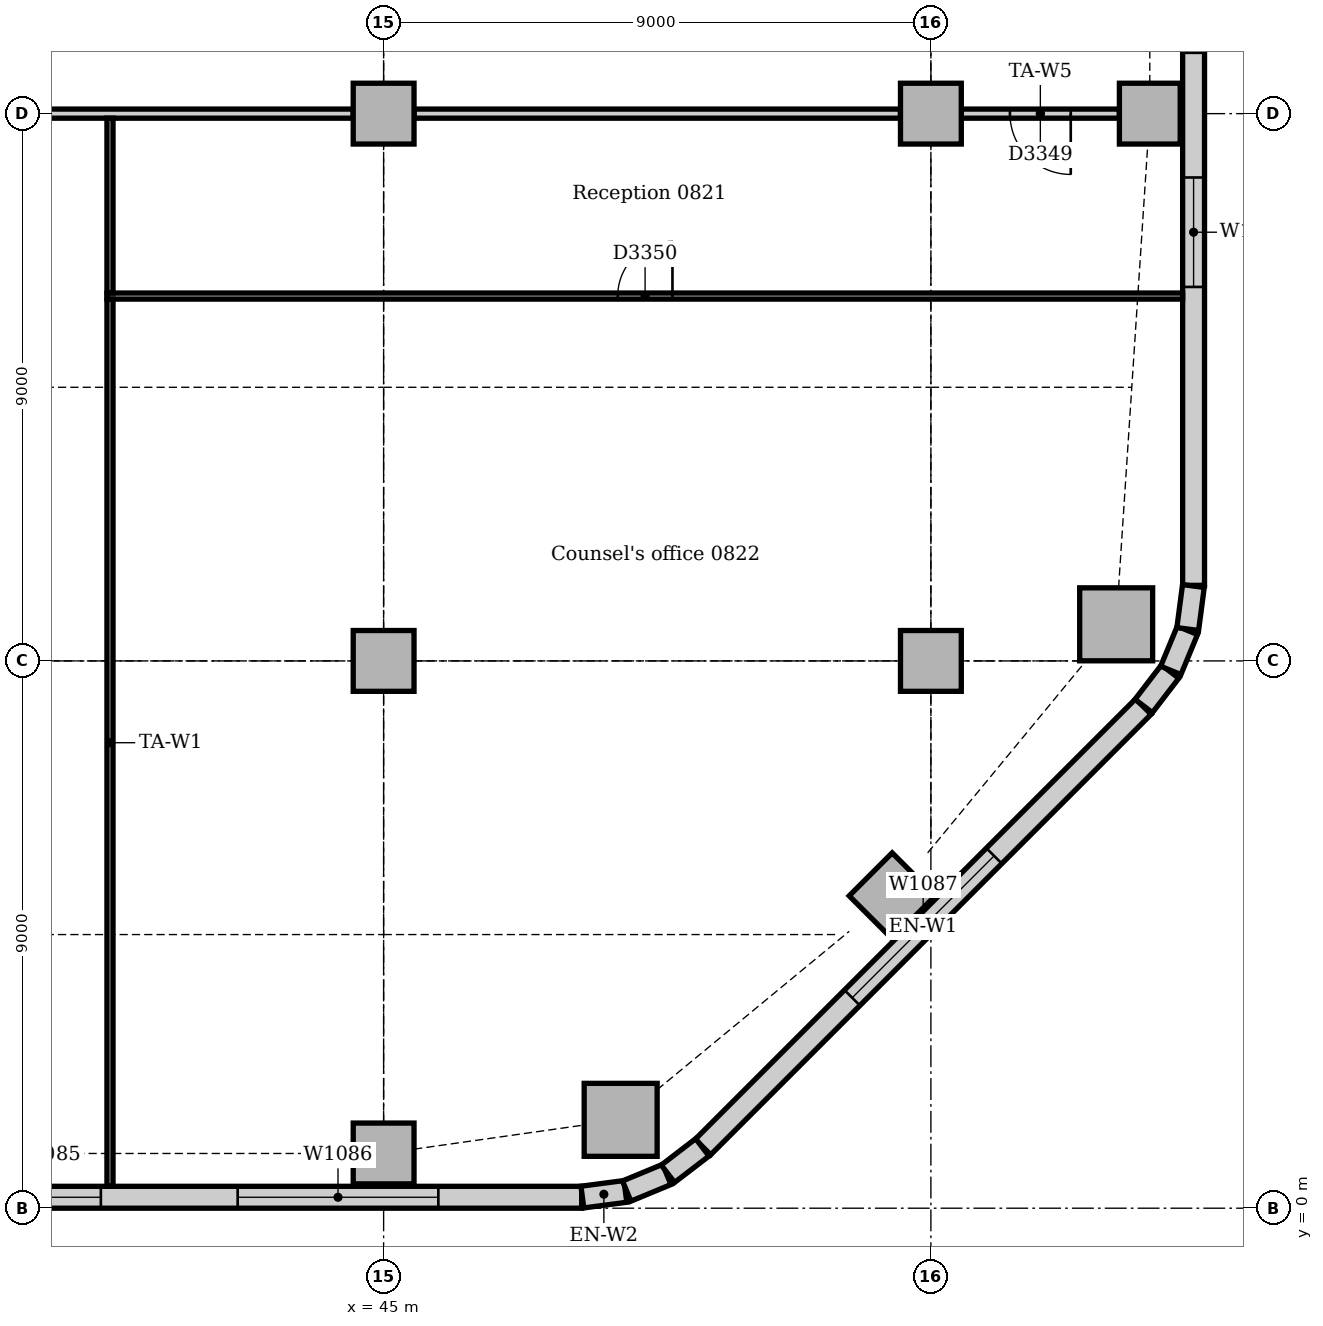
"""IFC4 building model, lengths in metres.
Left out: names, types, materials, properties, quantities, classifications, styles, units other than length and angle.
Written with IfcOpenShell. Run it as: python <this file> out.ifc"""

import sys

from ifc_helpers import new_model, si_unit, direction, frame, frame_2d, origin, origin_2d, place, context, subcontext, project, spatial, rectangle, extrude, element, fill, save


model = new_model("IFC4")
c1 = context("Model", 3, precision=1e-05, world=origin(), true_north=direction((0.0, 1.0)))
c2 = subcontext(c1, "Body", "Model", "MODEL_VIEW")
j1 = project(units=[si_unit("LENGTHUNIT", "METRE"), si_unit("PLANEANGLEUNIT", "RADIAN")], contexts=[c1])
p1 = place(None, origin())
s1 = spatial("IfcSite", under=j1, at=p1, CompositionType="ELEMENT")
p2 = place(p1, origin())
s2 = spatial("IfcBuilding", under=s1, at=p2, CompositionType="ELEMENT")
p3 = place(p2, frame((0.0, 0.0, 38.0)))
s3 = spatial("IfcBuildingStorey", under=s2, at=p3, CompositionType="ELEMENT", Elevation=38.0)
for number, where, z_axis, x_axis in (
    (1, (48.898, 1.453, 0.0), (0.0, 0.0, 1.0), (1.0, 0.0, 0.0)),
    (2, (57.047, 9.602, 0.0), (0.0, 0.0, 1.0), (1.0, 0.0, 0.0)),
):
    element("IfcColumn", number, at=place(p3, frame(where, z_axis=z_axis, x_axis=x_axis)), inside=s3, PredefinedType="COLUMN", context=c2, shape_type="SweptSolid", body=[
        extrude(rectangle(XDim=1.2, YDim=1.2, at=origin_2d()), origin(), (0.0, 0.0, 1.0), 3.85),
    ])
for number, where, z_axis, x_axis in (
    (3, (45.0, 0.9, 0.0), (0.0, 0.0, 1.0), (1.0, 0.0, 0.0)),
    (4, (53.364, 5.136, 0.0), (0.0, 0.0, 1.0), (0.707, 0.707, 0.0)),
    (5, (57.6, 18.0, 0.0), (0.0, 0.0, 1.0), (1.0, 0.0, 0.0)),
    (6, (45.0, 9.0, 0.0), (0.0, 0.0, 1.0), (1.0, 0.0, 0.0)),
    (7, (45.0, 18.0, 0.0), (0.0, 0.0, 1.0), (1.0, 0.0, 0.0)),
    (8, (54.0, 9.0, 0.0), (0.0, 0.0, 1.0), (1.0, 0.0, 0.0)),
    (9, (54.0, 18.0, 0.0), (0.0, 0.0, 1.0), (1.0, 0.0, 0.0)),
):
    element("IfcColumn", number, at=place(p3, frame(where, z_axis=z_axis, x_axis=x_axis)), inside=s3, PredefinedType="COLUMN", context=c2, shape_type="SweptSolid", body=[
        extrude(rectangle(XDim=1.0, YDim=1.0, at=origin_2d()), origin(), (0.0, 0.0, 1.0), 3.85),
    ])
p4 = place(p3, frame((4.243, 0.18, 0.0), z_axis=(0.0, 0.0, 1.0), x_axis=(1.0, 0.0, 0.0)))
e10 = element("IfcWall", 10, at=p4, inside=s3, PredefinedType="STANDARD", context=c2, shape_type="SweptSolid", body=[
    extrude(rectangle(XDim=44.015, YDim=0.36, at=frame_2d((22.007, 0.0))), origin(), (0.0, 0.0, 1.0), 3.85),
])
p5 = place(p4, frame((2.357, 0.0, 0.9)))
e11 = element("IfcOpeningElement", 11, at=p5, cuts=e10, PredefinedType="OPENING", context=c2, shape_type="SweptSolid", body=[
    extrude(rectangle(XDim=3.3, YDim=1.6, at=frame_2d((1.65, 0.8))), frame((0.0, 0.19, 0.0), z_axis=(0.0, -1.0, 0.0), x_axis=(1.0, 0.0, 0.0)), (0.0, 0.0, 1.0), 0.38),
])
p6 = place(p4, frame((6.857, 0.0, 0.9)))
e12 = element("IfcOpeningElement", 12, at=p6, cuts=e10, PredefinedType="OPENING", context=c2, shape_type="SweptSolid", body=[
    extrude(rectangle(XDim=3.3, YDim=1.6, at=frame_2d((1.65, 0.8))), frame((0.0, 0.19, 0.0), z_axis=(0.0, -1.0, 0.0), x_axis=(1.0, 0.0, 0.0)), (0.0, 0.0, 1.0), 0.38),
])
p7 = place(p4, frame((11.357, 0.0, 0.9)))
e13 = element("IfcOpeningElement", 13, at=p7, cuts=e10, PredefinedType="OPENING", context=c2, shape_type="SweptSolid", body=[
    extrude(rectangle(XDim=3.3, YDim=1.6, at=frame_2d((1.65, 0.8))), frame((0.0, 0.19, 0.0), z_axis=(0.0, -1.0, 0.0), x_axis=(1.0, 0.0, 0.0)), (0.0, 0.0, 1.0), 0.38),
])
p8 = place(p4, frame((15.857, 0.0, 0.9)))
e14 = element("IfcOpeningElement", 14, at=p8, cuts=e10, PredefinedType="OPENING", context=c2, shape_type="SweptSolid", body=[
    extrude(rectangle(XDim=3.3, YDim=1.6, at=frame_2d((1.65, 0.8))), frame((0.0, 0.19, 0.0), z_axis=(0.0, -1.0, 0.0), x_axis=(1.0, 0.0, 0.0)), (0.0, 0.0, 1.0), 0.38),
])
p9 = place(p4, frame((20.357, 0.0, 0.9)))
e15 = element("IfcOpeningElement", 15, at=p9, cuts=e10, PredefinedType="OPENING", context=c2, shape_type="SweptSolid", body=[
    extrude(rectangle(XDim=3.3, YDim=1.6, at=frame_2d((1.65, 0.8))), frame((0.0, 0.19, 0.0), z_axis=(0.0, -1.0, 0.0), x_axis=(1.0, 0.0, 0.0)), (0.0, 0.0, 1.0), 0.38),
])
p10 = place(p4, frame((25.307, 0.0, 0.9)))
e16 = element("IfcOpeningElement", 16, at=p10, cuts=e10, PredefinedType="OPENING", context=c2, shape_type="SweptSolid", body=[
    extrude(rectangle(XDim=1.8, YDim=1.6, at=frame_2d((0.9, 0.8))), frame((0.0, 0.19, 0.0), z_axis=(0.0, -1.0, 0.0), x_axis=(1.0, 0.0, 0.0)), (0.0, 0.0, 1.0), 0.38),
])
p11 = place(p4, frame((29.357, 0.0, 0.9)))
e17 = element("IfcOpeningElement", 17, at=p11, cuts=e10, PredefinedType="OPENING", context=c2, shape_type="SweptSolid", body=[
    extrude(rectangle(XDim=3.3, YDim=1.6, at=frame_2d((1.65, 0.8))), frame((0.0, 0.19, 0.0), z_axis=(0.0, -1.0, 0.0), x_axis=(1.0, 0.0, 0.0)), (0.0, 0.0, 1.0), 0.38),
])
p12 = place(p4, frame((34.307, 0.0, 0.9)))
e18 = element("IfcOpeningElement", 18, at=p12, cuts=e10, PredefinedType="OPENING", context=c2, shape_type="SweptSolid", body=[
    extrude(rectangle(XDim=1.8, YDim=1.6, at=frame_2d((0.9, 0.8))), frame((0.0, 0.19, 0.0), z_axis=(0.0, -1.0, 0.0), x_axis=(1.0, 0.0, 0.0)), (0.0, 0.0, 1.0), 0.38),
])
p13 = place(p4, frame((38.357, 0.0, 0.9)))
e19 = element("IfcOpeningElement", 19, at=p13, cuts=e10, PredefinedType="OPENING", context=c2, shape_type="SweptSolid", body=[
    extrude(rectangle(XDim=3.3, YDim=1.6, at=frame_2d((1.65, 0.8))), frame((0.0, 0.19, 0.0), z_axis=(0.0, -1.0, 0.0), x_axis=(1.0, 0.0, 0.0)), (0.0, 0.0, 1.0), 0.38),
])
p14 = place(p3, frame((50.251, 1.006, 0.0), z_axis=(0.0, 0.0, 1.0), x_axis=(0.707106781187, 0.707106781187, 0.0)))
e20 = element("IfcWall", 20, at=p14, inside=s3, PredefinedType="STANDARD", context=c2, shape_type="SweptSolid", body=[
    extrude(rectangle(XDim=10.243, YDim=0.36, at=frame_2d((5.121, 0.0))), origin(), (0.0, 0.0, 1.0), 3.85),
])
p15 = place(p14, frame((3.471, 0.0, 0.9)))
e21 = element("IfcOpeningElement", 21, at=p15, cuts=e20, PredefinedType="OPENING", context=c2, shape_type="SweptSolid", body=[
    extrude(rectangle(XDim=3.3, YDim=1.6, at=frame_2d((1.65, 0.8))), frame((0.0, 0.19, 0.0), z_axis=(0.0, -1.0, 0.0), x_axis=(1.0, 0.0, 0.0)), (0.0, 0.0, 1.0), 0.38),
])
p16 = place(p3, frame((58.32, 10.243, 0.0), z_axis=(0.0, 0.0, 1.0), x_axis=(0.0, 1.0, 0.0)))
e22 = element("IfcWall", 22, at=p16, inside=s3, PredefinedType="STANDARD", context=c2, shape_type="SweptSolid", body=[
    extrude(rectangle(XDim=24.515, YDim=0.36, at=frame_2d((12.257, 0.0))), origin(), (0.0, 0.0, 1.0), 3.85),
])
p17 = place(p16, frame((4.907, 0.0, 0.9)))
e23 = element("IfcOpeningElement", 23, at=p17, cuts=e22, PredefinedType="OPENING", context=c2, shape_type="SweptSolid", body=[
    extrude(rectangle(XDim=1.8, YDim=1.6, at=frame_2d((0.9, 0.8))), frame((0.0, 0.19, 0.0), z_axis=(0.0, -1.0, 0.0), x_axis=(1.0, 0.0, 0.0)), (0.0, 0.0, 1.0), 0.38),
])
p18 = place(p16, frame((8.757, 0.0, 0.9)))
e24 = element("IfcOpeningElement", 24, at=p18, cuts=e22, PredefinedType="OPENING", context=c2, shape_type="SweptSolid", body=[
    extrude(rectangle(XDim=1.8, YDim=1.6, at=frame_2d((0.9, 0.8))), frame((0.0, 0.19, 0.0), z_axis=(0.0, -1.0, 0.0), x_axis=(1.0, 0.0, 0.0)), (0.0, 0.0, 1.0), 0.38),
])
p19 = place(p16, frame((12.557, 0.0, 0.9)))
e25 = element("IfcOpeningElement", 25, at=p19, cuts=e22, PredefinedType="OPENING", context=c2, shape_type="SweptSolid", body=[
    extrude(rectangle(XDim=3.3, YDim=1.6, at=frame_2d((1.65, 0.8))), frame((0.0, 0.19, 0.0), z_axis=(0.0, -1.0, 0.0), x_axis=(1.0, 0.0, 0.0)), (0.0, 0.0, 1.0), 0.38),
])
p20 = place(p16, frame((17.357, 0.0, 0.9)))
e26 = element("IfcOpeningElement", 26, at=p20, cuts=e22, PredefinedType="OPENING", context=c2, shape_type="SweptSolid", body=[
    extrude(rectangle(XDim=3.3, YDim=1.6, at=frame_2d((1.65, 0.8))), frame((0.0, 0.19, 0.0), z_axis=(0.0, -1.0, 0.0), x_axis=(1.0, 0.0, 0.0)), (0.0, 0.0, 1.0), 0.38),
])
for number, where, z_axis, x_axis in (
    (27, (48.269, 0.183, 0.0), (0.0, 0.0, 1.0), (0.991, 0.131, 0.0)),
    (28, (48.997, 0.282, 0.0), (0.0, 0.0, 1.0), (0.924, 0.383, 0.0)),
):
    element("IfcWall", number, at=place(p3, frame(where, z_axis=z_axis, x_axis=x_axis)), inside=s3, PredefinedType="STANDARD", context=c2, shape_type="SweptSolid", body=[
        extrude(rectangle(XDim=0.713, YDim=0.36, at=frame_2d((0.356, 0.0))), origin(), (0.0, 0.0, 1.0), 3.85),
    ])
for number, where, z_axis, x_axis in (
    (29, (49.675, 0.566, 0.0), (0.0, 0.0, 1.0), (0.793, 0.609, 0.0)),
    (30, (57.5, 8.259, 0.0), (0.0, 0.0, 1.0), (0.609, 0.793, 0.0)),
):
    element("IfcWall", number, at=place(p3, frame(where, z_axis=z_axis, x_axis=x_axis)), inside=s3, PredefinedType="STANDARD", context=c2, shape_type="SweptSolid", body=[
        extrude(rectangle(XDim=0.713, YDim=0.36, at=frame_2d((0.357, 0.0))), origin(), (0.0, 0.0, 1.0), 3.85),
    ])
for number, where, z_axis, x_axis in (
    (31, (57.945, 8.844, 0.0), (0.0, 0.0, 1.0), (0.383, 0.924, 0.0)),
    (32, (58.224, 9.524, 0.0), (0.0, 0.0, 1.0), (0.131, 0.991, 0.0)),
):
    element("IfcWall", number, at=place(p3, frame(where, z_axis=z_axis, x_axis=x_axis)), inside=s3, PredefinedType="STANDARD", context=c2, shape_type="SweptSolid", body=[
        extrude(rectangle(XDim=0.713, YDim=0.36, at=frame_2d((0.356, 0.0))), origin(), (0.0, 0.0, 1.0), 3.85),
    ])
p21 = place(p3, frame((54.5, 18.0, 0.0), z_axis=(0.0, 0.0, 1.0), x_axis=(1.0, 0.0, 0.0)))
e33 = element("IfcWall", 33, at=p21, inside=s3, PredefinedType="PARTITIONING", context=c2, shape_type="SweptSolid", body=[
    extrude(rectangle(XDim=2.6, YDim=0.15, at=frame_2d((1.3, 0.0))), origin(), (0.0, 0.0, 1.0), 3.602),
])
p22 = place(p21, frame((0.8, 0.0, 0.0)))
e34 = element("IfcOpeningElement", 34, at=p22, cuts=e33, PredefinedType="OPENING", context=c2, shape_type="SweptSolid", body=[
    extrude(rectangle(XDim=1.0, YDim=2.1, at=frame_2d((0.5, 1.05))), frame((0.0, 0.085, 0.0), z_axis=(0.0, -1.0, 0.0), x_axis=(1.0, 0.0, 0.0)), (0.0, 0.0, 1.0), 0.17),
])
p23 = place(p3, frame((45.5, 18.0, 0.0), z_axis=(0.0, 0.0, 1.0), x_axis=(1.0, 0.0, 0.0)))
e35 = element("IfcWall", 35, at=p23, inside=s3, PredefinedType="PARTITIONING", context=c2, shape_type="SweptSolid", body=[
    extrude(rectangle(XDim=8.0, YDim=0.15, at=frame_2d((4.0, 0.0))), origin(), (0.0, 0.0, 1.0), 3.15),
])
p24 = place(p3, frame((36.5, 18.0, 0.0), z_axis=(0.0, 0.0, 1.0), x_axis=(1.0, 0.0, 0.0)))
e36 = element("IfcWall", 36, at=p24, inside=s3, PredefinedType="PARTITIONING", context=c2, shape_type="SweptSolid", body=[
    extrude(rectangle(XDim=8.0, YDim=0.15, at=frame_2d((4.0, 0.0))), origin(), (0.0, 0.0, 1.0), 3.15),
])
p25 = place(p24, frame((1.6, 0.0, 0.0)))
e37 = element("IfcOpeningElement", 37, at=p25, cuts=e36, PredefinedType="OPENING", context=c2, shape_type="SweptSolid", body=[
    extrude(rectangle(XDim=0.9, YDim=2.1, at=frame_2d((0.45, 1.05))), frame((0.0, 0.085, 0.0), z_axis=(0.0, -1.0, 0.0), x_axis=(1.0, 0.0, 0.0)), (0.0, 0.0, 1.0), 0.17),
])
p26 = place(p3, frame((40.45, 15.0, 0.0), z_axis=(0.0, 0.0, 1.0), x_axis=(1.0, 0.0, 0.0)))
e38 = element("IfcWall", 38, at=p26, inside=s3, PredefinedType="PARTITIONING", context=c2, shape_type="SweptSolid", body=[
    extrude(rectangle(XDim=17.69, YDim=0.1, at=frame_2d((8.845, 0.0))), origin(), (0.0, 0.0, 1.0), 3.85),
])
p27 = place(p26, frame((8.4, 0.0, 0.0)))
e39 = element("IfcOpeningElement", 39, at=p27, cuts=e38, PredefinedType="OPENING", context=c2, shape_type="SweptSolid", body=[
    extrude(rectangle(XDim=0.9, YDim=2.1, at=frame_2d((0.45, 1.05))), frame((0.0, 0.06, 0.0), z_axis=(0.0, -1.0, 0.0), x_axis=(1.0, 0.0, 0.0)), (0.0, 0.0, 1.0), 0.12),
])
p28 = place(p3, frame((40.5, 15.05, 0.0), z_axis=(0.0, 0.0, 1.0), x_axis=(0.0, 1.0, 0.0)))
e40 = element("IfcWall", 40, at=p28, inside=s3, PredefinedType="PARTITIONING", context=c2, shape_type="SweptSolid", body=[
    extrude(rectangle(XDim=2.875, YDim=0.1, at=frame_2d((1.438, 0.0))), origin(), (0.0, 0.0, 1.0), 3.85),
])
p29 = place(p3, frame((40.5, 0.36, 0.0), z_axis=(0.0, 0.0, 1.0), x_axis=(0.0, 1.0, 0.0)))
e41 = element("IfcWall", 41, at=p29, inside=s3, PredefinedType="PARTITIONING", context=c2, shape_type="SweptSolid", body=[
    extrude(rectangle(XDim=14.59, YDim=0.1, at=frame_2d((7.295, 0.0))), origin(), (0.0, 0.0, 1.0), 3.85),
])
p30 = place(p12, origin())
e42 = element("IfcWindow", 42, at=p30, inside=s3, PartitioningType="SINGLE_PANEL", PredefinedType="WINDOW", context=c2, shape_type="SweptSolid", body=[
    extrude(rectangle(XDim=1.8, YDim=1.6, at=frame_2d((0.9, 0.8))), frame((0.0, 0.13, 0.0), z_axis=(0.0, -1.0, 0.0), x_axis=(1.0, 0.0, 0.0)), (0.0, 0.0, 1.0), 0.06),
])
fill(e18, e42)
p31 = place(p13, origin())
e43 = element("IfcWindow", 43, at=p31, inside=s3, PartitioningType="SINGLE_PANEL", PredefinedType="WINDOW", context=c2, shape_type="SweptSolid", body=[
    extrude(rectangle(XDim=3.3, YDim=1.6, at=frame_2d((1.65, 0.8))), frame((0.0, 0.13, 0.0), z_axis=(0.0, -1.0, 0.0), x_axis=(1.0, 0.0, 0.0)), (0.0, 0.0, 1.0), 0.06),
])
fill(e19, e43)
p32 = place(p15, origin())
e44 = element("IfcWindow", 44, at=p32, inside=s3, PartitioningType="SINGLE_PANEL", PredefinedType="WINDOW", context=c2, shape_type="SweptSolid", body=[
    extrude(rectangle(XDim=3.3, YDim=1.6, at=frame_2d((1.65, 0.8))), frame((0.0, 0.13, 0.0), z_axis=(0.0, -1.0, 0.0), x_axis=(1.0, 0.0, 0.0)), (0.0, 0.0, 1.0), 0.06),
])
fill(e21, e44)
p33 = place(p17, origin())
e45 = element("IfcWindow", 45, at=p33, inside=s3, PartitioningType="SINGLE_PANEL", PredefinedType="WINDOW", context=c2, shape_type="SweptSolid", body=[
    extrude(rectangle(XDim=1.8, YDim=1.6, at=frame_2d((0.9, 0.8))), frame((0.0, 0.13, 0.0), z_axis=(0.0, -1.0, 0.0), x_axis=(1.0, 0.0, 0.0)), (0.0, 0.0, 1.0), 0.06),
])
fill(e23, e45)
p34 = place(p22, frame((1.0, 0.0, 0.0), z_axis=(0.0, 0.0, 1.0), x_axis=(-1.0, 0.0, 0.0)))
e46 = element("IfcDoor", 46, at=p34, inside=s3, OperationType="SINGLE_SWING_LEFT", PredefinedType="DOOR", context=c2, shape_type="SweptSolid", body=[
    extrude(rectangle(XDim=1.0, YDim=2.1, at=frame_2d((0.5, 1.05))), frame((0.0, 0.025, 0.0), z_axis=(0.0, -1.0, 0.0), x_axis=(1.0, 0.0, 0.0)), (0.0, 0.0, 1.0), 0.05),
])
fill(e34, e46)
p35 = place(p27, origin())
e47 = element("IfcDoor", 47, at=p35, inside=s3, OperationType="SINGLE_SWING_RIGHT", PredefinedType="DOOR", context=c2, shape_type="SweptSolid", body=[
    extrude(rectangle(XDim=0.9, YDim=2.1, at=frame_2d((0.45, 1.05))), frame((0.0, 0.025, 0.0), z_axis=(0.0, -1.0, 0.0), x_axis=(1.0, 0.0, 0.0)), (0.0, 0.0, 1.0), 0.05),
])
fill(e39, e47)
save(model, sys.argv[1])
